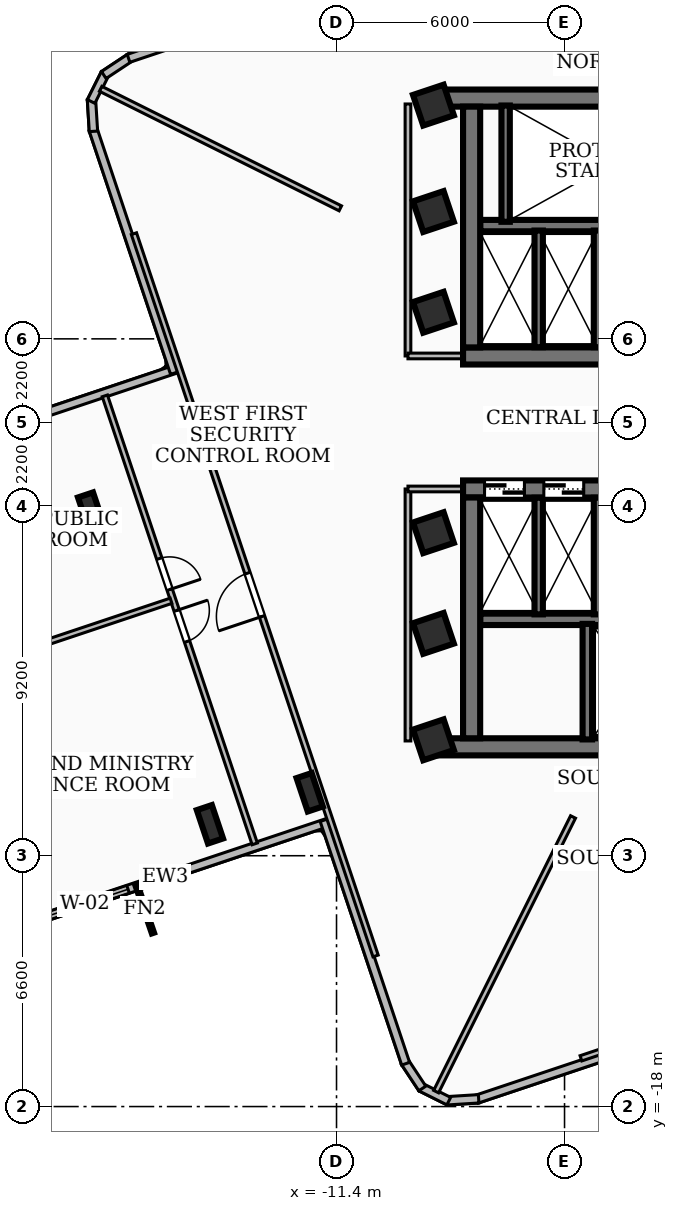
"""IFC4 building model, lengths in metres.
Left out: names, types, materials, properties, quantities, classifications, styles, units other than length and angle.
Written with IfcOpenShell. Run it as: python <this file> out.ifc"""

import sys

from ifc_helpers import new_model, si_unit, direction, frame, frame_2d, origin, origin_2d, place, context, subcontext, project, spatial, rectangle, i_section, extrude, element, fill, save


model = new_model("IFC4")
c1 = context("Model", 3, precision=1e-05, world=origin(), true_north=direction((0.0, 1.0)))
c2 = subcontext(c1, "Body", "Model", "MODEL_VIEW")
j1 = project(units=[si_unit("LENGTHUNIT", "METRE"), si_unit("PLANEANGLEUNIT", "RADIAN")], contexts=[c1])
p1 = place(None, origin())
s1 = spatial("IfcSite", under=j1, at=p1, CompositionType="ELEMENT")
p2 = place(p1, origin())
s2 = spatial("IfcBuilding", under=s1, at=p2, CompositionType="ELEMENT")
p3 = place(p2, frame((0.0, 0.0, 159.48)))
s3 = spatial("IfcBuildingStorey", under=s2, at=p3, CompositionType="ELEMENT", Elevation=159.48)
p4 = place(p3, frame((-8.78, 8.535, 0.0), z_axis=(0.0, 0.0, 1.0), x_axis=(1.0, 0.0, 0.0)))
e1 = element("IfcWall", 1, at=p4, inside=s3, PredefinedType="SHEAR", context=c2, shape_type="SweptSolid", body=[
    extrude(rectangle(XDim=17.56, YDim=0.45, at=frame_2d((8.78, 0.0))), origin(), (0.0, 0.0, 1.0), 3.34),
])
p5 = place(p3, frame((8.07, 1.75, 0.0), z_axis=(0.0, 0.0, 1.0), x_axis=(-1.0, 0.0, 0.0)))
e2 = element("IfcWall", 2, at=p5, inside=s3, PredefinedType="SHEAR", context=c2, shape_type="SweptSolid", body=[
    extrude(rectangle(XDim=16.14, YDim=0.45, at=frame_2d((8.07, 0.0))), origin(), (0.0, 0.0, 1.0), 3.34),
])
p6 = place(p5, frame((7.45, 0.0, 0.0)))
e3 = element("IfcOpeningElement", 3, at=p6, cuts=e2, PredefinedType="OPENING", context=c2, shape_type="SweptSolid", body=[
    extrude(rectangle(XDim=1.0, YDim=2.1, at=frame_2d((0.5, 1.05))), frame((0.0, 0.235, 0.0), z_axis=(0.0, -1.0, 0.0), x_axis=(1.0, 0.0, 0.0)), (0.0, 0.0, 1.0), 0.47),
])
p7 = place(p5, frame((3.4, 0.0, 0.0)))
e4 = element("IfcOpeningElement", 4, at=p7, cuts=e2, PredefinedType="OPENING", context=c2, shape_type="SweptSolid", body=[
    extrude(rectangle(XDim=0.9, YDim=2.06, at=frame_2d((0.45, 1.03))), frame((0.0, 0.235, 0.0), z_axis=(0.0, -1.0, 0.0), x_axis=(1.0, 0.0, 0.0)), (0.0, 0.0, 1.0), 0.47),
])
p8 = place(p5, frame((1.1, 0.0, 0.0)))
e5 = element("IfcOpeningElement", 5, at=p8, cuts=e2, PredefinedType="OPENING", context=c2, shape_type="SweptSolid", body=[
    extrude(rectangle(XDim=0.9, YDim=2.06, at=frame_2d((0.45, 1.03))), frame((0.0, 0.235, 0.0), z_axis=(0.0, -1.0, 0.0), x_axis=(1.0, 0.0, 0.0)), (0.0, 0.0, 1.0), 0.47),
])
p9 = place(p3, frame((-7.845, 1.975, 0.0), z_axis=(0.0, 0.0, 1.0), x_axis=(0.0, 1.0, 0.0)))
e6 = element("IfcWall", 6, at=p9, inside=s3, PredefinedType="SHEAR", context=c2, shape_type="SweptSolid", body=[
    extrude(rectangle(XDim=6.335, YDim=0.45, at=frame_2d((3.167, 0.0))), origin(), (0.0, 0.0, 1.0), 3.34),
])
p10 = place(p3, frame((7.62, 5.18, 0.0), z_axis=(0.0, 0.0, 1.0), x_axis=(-1.0, 0.0, 0.0)))
e7 = element("IfcWall", 7, at=p10, inside=s3, PredefinedType="SOLIDWALL", context=c2, shape_type="SweptSolid", body=[
    extrude(rectangle(XDim=15.24, YDim=0.3, at=frame_2d((7.62, 0.0))), origin(), (0.0, 0.0, 1.0), 3.34),
])
p11 = place(p10, frame((5.77, 0.0, 0.0)))
e8 = element("IfcOpeningElement", 8, at=p11, cuts=e7, PredefinedType="OPENING", context=c2, shape_type="SweptSolid", body=[
    extrude(rectangle(XDim=1.1, YDim=2.15, at=frame_2d((0.55, 1.075))), frame((0.0, 0.16, 0.0), z_axis=(0.0, -1.0, 0.0), x_axis=(1.0, 0.0, 0.0)), (0.0, 0.0, 1.0), 0.32),
])
p12 = place(p10, frame((2.97, 0.0, 0.0)))
e9 = element("IfcOpeningElement", 9, at=p12, cuts=e7, PredefinedType="OPENING", context=c2, shape_type="SweptSolid", body=[
    extrude(rectangle(XDim=1.1, YDim=2.15, at=frame_2d((0.55, 1.075))), frame((0.0, 0.16, 0.0), z_axis=(0.0, -1.0, 0.0), x_axis=(1.0, 0.0, 0.0)), (0.0, 0.0, 1.0), 0.32),
])
p13 = place(p10, frame((7.97, 0.0, 0.0)))
e10 = element("IfcOpeningElement", 10, at=p13, cuts=e7, PredefinedType="OPENING", context=c2, shape_type="SweptSolid", body=[
    extrude(rectangle(XDim=1.0, YDim=2.1, at=frame_2d((0.5, 1.05))), frame((0.0, 0.16, 0.0), z_axis=(0.0, -1.0, 0.0), x_axis=(1.0, 0.0, 0.0)), (0.0, 0.0, 1.0), 0.32),
])
p14 = place(p3, frame((8.78, -8.535, 0.0), z_axis=(0.0, 0.0, 1.0), x_axis=(-1.0, 0.0, 0.0)))
e11 = element("IfcWall", 11, at=p14, inside=s3, PredefinedType="SHEAR", context=c2, shape_type="SweptSolid", body=[
    extrude(rectangle(XDim=17.56, YDim=0.45, at=frame_2d((8.78, 0.0))), origin(), (0.0, 0.0, 1.0), 3.34),
])
p15 = place(p3, frame((-8.07, -1.75, 0.0), z_axis=(0.0, 0.0, 1.0), x_axis=(1.0, 0.0, 0.0)))
e12 = element("IfcWall", 12, at=p15, inside=s3, PredefinedType="SHEAR", context=c2, shape_type="SweptSolid", body=[
    extrude(rectangle(XDim=16.14, YDim=0.45, at=frame_2d((8.07, 0.0))), origin(), (0.0, 0.0, 1.0), 3.34),
])
p16 = place(p15, frame((7.45, 0.0, 0.0)))
e13 = element("IfcOpeningElement", 13, at=p16, cuts=e12, PredefinedType="OPENING", context=c2, shape_type="SweptSolid", body=[
    extrude(rectangle(XDim=1.0, YDim=2.1, at=frame_2d((0.5, 1.05))), frame((0.0, 0.235, 0.0), z_axis=(0.0, -1.0, 0.0), x_axis=(1.0, 0.0, 0.0)), (0.0, 0.0, 1.0), 0.47),
])
p17 = place(p15, frame((12.65, 0.0, 0.0)))
e14 = element("IfcOpeningElement", 14, at=p17, cuts=e12, PredefinedType="OPENING", context=c2, shape_type="SweptSolid", body=[
    extrude(rectangle(XDim=0.9, YDim=2.06, at=frame_2d((0.45, 1.03))), frame((0.0, 0.235, 0.0), z_axis=(0.0, -1.0, 0.0), x_axis=(1.0, 0.0, 0.0)), (0.0, 0.0, 1.0), 0.47),
])
p18 = place(p15, frame((0.565, 0.0, 0.0)))
e15 = element("IfcOpeningElement", 15, at=p18, cuts=e12, PredefinedType="OPENING", context=c2, shape_type="SweptSolid", body=[
    extrude(rectangle(XDim=1.05, YDim=2.15, at=frame_2d((0.525, 1.075))), frame((0.0, 0.235, 0.0), z_axis=(0.0, -1.0, 0.0), x_axis=(1.0, 0.0, 0.0)), (0.0, 0.0, 1.0), 0.47),
])
p19 = place(p15, frame((2.125, 0.0, 0.0)))
e16 = element("IfcOpeningElement", 16, at=p19, cuts=e12, PredefinedType="OPENING", context=c2, shape_type="SweptSolid", body=[
    extrude(rectangle(XDim=1.05, YDim=2.15, at=frame_2d((0.525, 1.075))), frame((0.0, 0.235, 0.0), z_axis=(0.0, -1.0, 0.0), x_axis=(1.0, 0.0, 0.0)), (0.0, 0.0, 1.0), 0.47),
])
p20 = place(p15, frame((3.685, 0.0, 0.0)))
e17 = element("IfcOpeningElement", 17, at=p20, cuts=e12, PredefinedType="OPENING", context=c2, shape_type="SweptSolid", body=[
    extrude(rectangle(XDim=1.05, YDim=2.15, at=frame_2d((0.525, 1.075))), frame((0.0, 0.235, 0.0), z_axis=(0.0, -1.0, 0.0), x_axis=(1.0, 0.0, 0.0)), (0.0, 0.0, 1.0), 0.47),
])
p21 = place(p3, frame((-7.845, -8.31, 0.0), z_axis=(0.0, 0.0, 1.0), x_axis=(0.0, 1.0, 0.0)))
e18 = element("IfcWall", 18, at=p21, inside=s3, PredefinedType="SHEAR", context=c2, shape_type="SweptSolid", body=[
    extrude(rectangle(XDim=6.335, YDim=0.45, at=frame_2d((3.167, 0.0))), origin(), (0.0, 0.0, 1.0), 3.34),
])
p22 = place(p3, frame((-7.62, -5.18, 0.0), z_axis=(0.0, 0.0, 1.0), x_axis=(1.0, 0.0, 0.0)))
e19 = element("IfcWall", 19, at=p22, inside=s3, PredefinedType="SOLIDWALL", context=c2, shape_type="SweptSolid", body=[
    extrude(rectangle(XDim=15.24, YDim=0.3, at=frame_2d((7.62, 0.0))), origin(), (0.0, 0.0, 1.0), 3.34),
])
p23 = place(p22, frame((5.77, 0.0, 0.0)))
e20 = element("IfcOpeningElement", 20, at=p23, cuts=e19, PredefinedType="OPENING", context=c2, shape_type="SweptSolid", body=[
    extrude(rectangle(XDim=1.1, YDim=2.15, at=frame_2d((0.55, 1.075))), frame((0.0, 0.16, 0.0), z_axis=(0.0, -1.0, 0.0), x_axis=(1.0, 0.0, 0.0)), (0.0, 0.0, 1.0), 0.32),
])
p24 = place(p22, frame((7.97, 0.0, 0.0)))
e21 = element("IfcOpeningElement", 21, at=p24, cuts=e19, PredefinedType="OPENING", context=c2, shape_type="SweptSolid", body=[
    extrude(rectangle(XDim=1.0, YDim=2.1, at=frame_2d((0.5, 1.05))), frame((0.0, 0.16, 0.0), z_axis=(0.0, -1.0, 0.0), x_axis=(1.0, 0.0, 0.0)), (0.0, 0.0, 1.0), 0.32),
])
p25 = place(p3, frame((-6.95, 5.28, 0.0), z_axis=(0.0, 0.0, 1.0), x_axis=(0.0, 1.0, 0.0)))
e22 = element("IfcWall", 22, at=p25, inside=s3, PredefinedType="SOLIDWALL", context=c2, shape_type="SweptSolid", body=[
    extrude(rectangle(XDim=3.06, YDim=0.22, at=frame_2d((1.53, 0.0))), origin(), (0.0, 0.0, 1.0), 3.34),
])
p26 = place(p3, frame((-4.8, -8.34, 0.0), z_axis=(0.0, 0.0, 1.0), x_axis=(0.0, 1.0, 0.0)))
e23 = element("IfcWall", 23, at=p26, inside=s3, PredefinedType="SOLIDWALL", context=c2, shape_type="SweptSolid", body=[
    extrude(rectangle(XDim=3.04, YDim=0.25, at=frame_2d((1.52, 0.0))), origin(), (0.0, 0.0, 1.0), 3.34),
])
for number, where, z_axis, x_axis in (
    (24, (-6.08, 1.98, 0.0), (0.0, 0.0, 1.0), (0.0, 1.0, 0.0)),
    (25, (-4.52, 1.98, 0.0), (0.0, 0.0, 1.0), (0.0, 1.0, 0.0)),
    (26, (-6.08, -5.05, 0.0), (0.0, 0.0, 1.0), (0.0, 1.0, 0.0)),
    (27, (-4.52, -5.05, 0.0), (0.0, 0.0, 1.0), (0.0, 1.0, 0.0)),
):
    element("IfcWall", number, at=place(p3, frame(where, z_axis=z_axis, x_axis=x_axis)), inside=s3, PredefinedType="SOLIDWALL", context=c2, shape_type="SweptSolid", body=[
        extrude(rectangle(XDim=3.07, YDim=0.22, at=frame_2d((1.535, 0.0))), origin(), (0.0, 0.0, 1.0), 3.34),
    ])
for number, where, z_axis, x_axis in (
    (28, (-8.85, -5.55, 0.0), (0.0, 0.0, 1.0), (0.948, 0.317, 0.0)),
    (29, (-8.85, -2.9, 0.0), (0.0, 0.0, 1.0), (0.948, 0.317, 0.0)),
    (30, (-8.85, 2.9, 0.0), (0.0, 0.0, 1.0), (0.948, 0.317, 0.0)),
    (31, (-8.85, 5.55, 0.0), (0.0, 0.0, 1.0), (0.948, 0.317, 0.0)),
    (32, (-8.85, 8.35, 0.0), (0.0, 0.0, 1.0), (0.948, 0.317, 0.0)),
    (33, (-8.85, -8.35, 0.0), (0.0, 0.0, 1.0), (0.948, 0.317, 0.0)),
):
    element("IfcColumn", number, at=place(p3, frame(where, z_axis=z_axis, x_axis=x_axis)), inside=s3, PredefinedType="COLUMN", context=c2, shape_type="SweptSolid", body=[
        extrude(rectangle(XDim=0.85, YDim=0.85, at=origin_2d()), origin(), (0.0, 0.0, 1.0), 3.6),
    ])
for number, where, z_axis, x_axis in (
    (34, (-17.858, -2.346, 0.0), (0.0, 0.0, 1.0), (0.948, 0.317, 0.0)),
    (35, (-12.106, -9.731, 0.0), (0.0, 0.0, 1.0), (0.948, 0.317, 0.0)),
    (36, (-14.731, -10.573, 0.0), (0.0, 0.0, 1.0), (0.948, 0.317, 0.0)),
):
    element("IfcColumn", number, at=place(p3, frame(where, z_axis=z_axis, x_axis=x_axis)), inside=s3, PredefinedType="COLUMN", context=c2, shape_type="SweptSolid", body=[
        extrude(i_section(OverallWidth=0.418, OverallDepth=0.927, WebThickness=0.019, FlangeThickness=0.032, at=origin_2d()), origin(), (0.0, 0.0, 1.0), 3.6),
    ])
p27 = place(p3, frame((-11.615, -10.519, 0.0), z_axis=(0.0, 0.0, 1.0), x_axis=(-0.948329626758, -0.317286808759, 0.0)))
e37 = element("IfcWall", 37, at=p27, inside=s3, PredefinedType="SOLIDWALL", context=c2, shape_type="SweptSolid", body=[
    extrude(rectangle(XDim=9.058, YDim=0.22, at=frame_2d((4.529, 0.0))), origin(), (0.0, 0.0, 1.0), 3.34),
])
p28 = place(p27, frame((5.558, 0.0, 0.85)))
e38 = element("IfcOpeningElement", 38, at=p28, cuts=e37, PredefinedType="OPENING", context=c2, shape_type="SweptSolid", body=[
    extrude(rectangle(XDim=2.4, YDim=2.1, at=frame_2d((1.2, 1.05))), frame((0.0, 0.12, 0.0), z_axis=(0.0, -1.0, 0.0), x_axis=(1.0, 0.0, 0.0)), (0.0, 0.0, 1.0), 0.24),
])
p29 = place(p3, frame((-24.197, -1.463, 0.0), z_axis=(0.0, 0.0, 1.0), x_axis=(0.948337736373, 0.31726256913, 0.0)))
e39 = element("IfcWall", 39, at=p29, inside=s3, PredefinedType="SOLIDWALL", context=c2, shape_type="SweptSolid", body=[
    extrude(rectangle(XDim=9.058, YDim=0.22, at=frame_2d((4.529, 0.0))), origin(), (0.0, 0.0, 1.0), 3.34),
])
p30 = place(p29, frame((1.1, 0.0, 0.85)))
e40 = element("IfcOpeningElement", 40, at=p30, cuts=e39, PredefinedType="OPENING", context=c2, shape_type="SweptSolid", body=[
    extrude(rectangle(XDim=2.4, YDim=1.65, at=frame_2d((1.2, 0.825))), frame((0.0, 0.12, 0.0), z_axis=(0.0, -1.0, 0.0), x_axis=(1.0, 0.0, 0.0)), (0.0, 0.0, 1.0), 0.24),
])
p31 = place(p3, frame((-15.662, 1.3, 0.0), z_axis=(0.0, 0.0, 1.0), x_axis=(-0.317224676093, 0.948350412494, 0.0)))
e41 = element("IfcWall", 41, at=p31, inside=s3, PredefinedType="SOLIDWALL", context=c2, shape_type="SweptSolid", body=[
    extrude(rectangle(XDim=6.758, YDim=0.22, at=frame_2d((3.379, 0.0))), origin(), (0.0, 0.0, 1.0), 3.34),
])
p32 = place(p3, frame((-17.796, 7.66, 0.0), z_axis=(0.0, 0.0, 1.0), x_axis=(-0.062305442082, 0.998057128569, 0.0)))
e42 = element("IfcWall", 42, at=p32, inside=s3, PredefinedType="SOLIDWALL", context=c2, shape_type="SweptSolid", body=[
    extrude(rectangle(XDim=0.835, YDim=0.22, at=frame_2d((0.417, 0.0))), origin(), (0.0, 0.0, 1.0), 3.34),
])
p33 = place(p3, frame((-17.857, 8.446, 0.0), z_axis=(0.0, 0.0, 1.0), x_axis=(0.446258139106, 0.894904281631, 0.0)))
e43 = element("IfcWall", 43, at=p33, inside=s3, PredefinedType="SOLIDWALL", context=c2, shape_type="SweptSolid", body=[
    extrude(rectangle(XDim=0.818, YDim=0.22, at=frame_2d((0.409, 0.0))), origin(), (0.0, 0.0, 1.0), 3.34),
])
p34 = place(p3, frame((-17.524, 9.142, 0.0), z_axis=(0.0, 0.0, 1.0), x_axis=(0.833756011094, 0.552133058206, 0.0)))
e44 = element("IfcWall", 44, at=p34, inside=s3, PredefinedType="SOLIDWALL", context=c2, shape_type="SweptSolid", body=[
    extrude(rectangle(XDim=0.835, YDim=0.22, at=frame_2d((0.417, 0.0))), origin(), (0.0, 0.0, 1.0), 3.34),
])
p35 = place(p3, frame((-16.873, 9.581, 0.0), z_axis=(0.0, 0.0, 1.0), x_axis=(0.94829606055, 0.317387116224, 0.0)))
e45 = element("IfcWall", 45, at=p35, inside=s3, PredefinedType="SOLIDWALL", context=c2, shape_type="SweptSolid", body=[
    extrude(rectangle(XDim=6.758, YDim=0.22, at=frame_2d((3.379, 0.0))), origin(), (0.0, 0.0, 1.0), 3.34),
])
p36 = place(p3, frame((-1.3, -15.662, 0.0), z_axis=(0.0, 0.0, 1.0), x_axis=(-0.948350412494, -0.317224676093, 0.0)))
e46 = element("IfcWall", 46, at=p36, inside=s3, PredefinedType="SOLIDWALL", context=c2, shape_type="SweptSolid", body=[
    extrude(rectangle(XDim=6.758, YDim=0.22, at=frame_2d((3.379, 0.0))), origin(), (0.0, 0.0, 1.0), 3.34),
])
p37 = place(p3, frame((-7.66, -17.796, 0.0), z_axis=(0.0, 0.0, 1.0), x_axis=(-0.998057128569, -0.062305442082, 0.0)))
e47 = element("IfcWall", 47, at=p37, inside=s3, PredefinedType="SOLIDWALL", context=c2, shape_type="SweptSolid", body=[
    extrude(rectangle(XDim=0.835, YDim=0.22, at=frame_2d((0.417, 0.0))), origin(), (0.0, 0.0, 1.0), 3.34),
])
p38 = place(p3, frame((-8.446, -17.857, 0.0), z_axis=(0.0, 0.0, 1.0), x_axis=(-0.894904281631, 0.446258139106, 0.0)))
e48 = element("IfcWall", 48, at=p38, inside=s3, PredefinedType="SOLIDWALL", context=c2, shape_type="SweptSolid", body=[
    extrude(rectangle(XDim=0.818, YDim=0.22, at=frame_2d((0.409, 0.0))), origin(), (0.0, 0.0, 1.0), 3.34),
])
p39 = place(p3, frame((-9.142, -17.524, 0.0), z_axis=(0.0, 0.0, 1.0), x_axis=(-0.552133058206, 0.833756011094, 0.0)))
e49 = element("IfcWall", 49, at=p39, inside=s3, PredefinedType="SOLIDWALL", context=c2, shape_type="SweptSolid", body=[
    extrude(rectangle(XDim=0.835, YDim=0.22, at=frame_2d((0.417, 0.0))), origin(), (0.0, 0.0, 1.0), 3.34),
])
p40 = place(p3, frame((-9.581, -16.873, 0.0), z_axis=(0.0, 0.0, 1.0), x_axis=(-0.317387116224, 0.94829606055, 0.0)))
e50 = element("IfcWall", 50, at=p40, inside=s3, PredefinedType="SOLIDWALL", context=c2, shape_type="SweptSolid", body=[
    extrude(rectangle(XDim=6.758, YDim=0.22, at=frame_2d((3.379, 0.0))), origin(), (0.0, 0.0, 1.0), 3.34),
])
p41 = place(p3, frame((-9.52, 1.75, 0.0), z_axis=(0.0, 0.0, 1.0), x_axis=(0.0, 1.0, 0.0)))
e51 = element("IfcWall", 51, at=p41, inside=s3, PredefinedType="PARTITIONING", context=c2, shape_type="SweptSolid", body=[
    extrude(rectangle(XDim=6.63, YDim=0.15, at=frame_2d((3.315, 0.0))), origin(), (0.0, 0.0, 1.0), 3.34),
])
p42 = place(p3, frame((-7.85, 1.75, 0.0), z_axis=(0.0, 0.0, 1.0), x_axis=(-1.0, 0.0, 0.0)))
e52 = element("IfcWall", 52, at=p42, inside=s3, PredefinedType="PARTITIONING", context=c2, shape_type="SweptSolid", body=[
    extrude(rectangle(XDim=1.67, YDim=0.15, at=frame_2d((0.835, 0.0))), origin(), (0.0, 0.0, 1.0), 2.57),
])
p43 = place(p3, frame((-9.52, -8.38, 0.0), z_axis=(0.0, 0.0, 1.0), x_axis=(0.0, 1.0, 0.0)))
e53 = element("IfcWall", 53, at=p43, inside=s3, PredefinedType="PARTITIONING", context=c2, shape_type="SweptSolid", body=[
    extrude(rectangle(XDim=6.63, YDim=0.15, at=frame_2d((3.315, 0.0))), origin(), (0.0, 0.0, 1.0), 2.644),
])
p44 = place(p3, frame((-7.85, -1.75, 0.0), z_axis=(0.0, 0.0, 1.0), x_axis=(-1.0, 0.0, 0.0)))
e54 = element("IfcWall", 54, at=p44, inside=s3, PredefinedType="PARTITIONING", context=c2, shape_type="SweptSolid", body=[
    extrude(rectangle(XDim=1.67, YDim=0.15, at=frame_2d((0.835, 0.0))), origin(), (0.0, 0.0, 1.0), 2.57),
])
p45 = place(p3, frame((-11.3, 5.634, 0.0), z_axis=(0.0, 0.0, 1.0), x_axis=(-0.894904738475, 0.446257222972, 0.0)))
e55 = element("IfcWall", 55, at=p45, inside=s3, PredefinedType="PARTITIONING", context=c2, shape_type="SweptSolid", body=[
    extrude(rectangle(XDim=7.048, YDim=0.145, at=frame_2d((3.524, 0.0))), origin(), (0.0, 0.0, 1.0), 3.34),
])
p46 = place(p3, frame((-5.176, -10.38, 0.0), z_axis=(0.0, 0.0, 1.0), x_axis=(-0.446173290391, -0.894946587759, 0.0)))
e56 = element("IfcWall", 56, at=p46, inside=s3, PredefinedType="PARTITIONING", context=c2, shape_type="SweptSolid", body=[
    extrude(rectangle(XDim=8.075, YDim=0.145, at=frame_2d((4.038, 0.0))), origin(), (0.0, 0.0, 1.0), 3.34),
])
p47 = place(p3, frame((-10.372, -14.037, 0.0), z_axis=(0.0, 0.0, 1.0), x_axis=(-0.317298382655, 0.94832575435, 0.0)))
e57 = element("IfcWall", 57, at=p47, inside=s3, PredefinedType="PARTITIONING", context=c2, shape_type="SweptSolid", body=[
    extrude(rectangle(XDim=20.041, YDim=0.145, at=frame_2d((10.021, 0.0))), origin(), (0.0, 0.0, 1.0), 2.644),
])
p48 = place(p47, frame((9.42, 0.0, 0.0)))
e58 = element("IfcOpeningElement", 58, at=p48, cuts=e57, PredefinedType="OPENING", context=c2, shape_type="SweptSolid", body=[
    extrude(rectangle(XDim=1.2, YDim=2.1, at=frame_2d((0.6, 1.05))), frame((0.0, 0.083, 0.0), z_axis=(0.0, -1.0, 0.0), x_axis=(1.0, 0.0, 0.0)), (0.0, 0.0, 1.0), 0.165),
])
p49 = place(p3, frame((-15.755, -4.692, 0.0), z_axis=(0.0, 0.0, 1.0), x_axis=(-0.948309976651, -0.31734553437, 0.0)))
e59 = element("IfcWall", 59, at=p49, inside=s3, PredefinedType="PARTITIONING", context=c2, shape_type="SweptSolid", body=[
    extrude(rectangle(XDim=8.385, YDim=0.145, at=frame_2d((4.193, 0.0))), origin(), (0.0, 0.0, 1.0), 2.793),
])
p50 = place(p3, frame((-17.496, 0.7, 0.0), z_axis=(0.0, 0.0, 1.0), x_axis=(0.317299961245, -0.948325226172, 0.0)))
e60 = element("IfcWall", 60, at=p50, inside=s3, PredefinedType="PARTITIONING", context=c2, shape_type="SweptSolid", body=[
    extrude(rectangle(XDim=12.43, YDim=0.145, at=frame_2d((6.215, 0.0))), origin(), (0.0, 0.0, 1.0), 2.644),
])
p51 = place(p50, frame((4.515, 0.0, 0.0)))
e61 = element("IfcOpeningElement", 61, at=p51, cuts=e60, PredefinedType="OPENING", context=c2, shape_type="SweptSolid", body=[
    extrude(rectangle(XDim=0.86, YDim=2.04, at=frame_2d((0.43, 1.02))), frame((0.0, 0.083, 0.0), z_axis=(0.0, -1.0, 0.0), x_axis=(1.0, 0.0, 0.0)), (0.0, 0.0, 1.0), 0.165),
])
p52 = place(p50, frame((5.955, 0.0, 0.0)))
e62 = element("IfcOpeningElement", 62, at=p52, cuts=e60, PredefinedType="OPENING", context=c2, shape_type="SweptSolid", body=[
    extrude(rectangle(XDim=0.86, YDim=2.04, at=frame_2d((0.43, 1.02))), frame((0.0, 0.083, 0.0), z_axis=(0.0, -1.0, 0.0), x_axis=(1.0, 0.0, 0.0)), (0.0, 0.0, 1.0), 0.165),
])
p53 = place(p3, frame((14.037, -10.372, 0.0), z_axis=(0.0, 0.0, 1.0), x_axis=(-0.94832575435, -0.317298382655, 0.0)))
e63 = element("IfcWall", 63, at=p53, inside=s3, PredefinedType="PARTITIONING", context=c2, shape_type="SweptSolid", body=[
    extrude(rectangle(XDim=20.041, YDim=0.145, at=frame_2d((10.021, 0.0))), origin(), (0.0, 0.0, 1.0), 2.644),
])
p54 = place(p53, frame((9.42, 0.0, 0.0)))
e64 = element("IfcOpeningElement", 64, at=p54, cuts=e63, PredefinedType="OPENING", context=c2, shape_type="SweptSolid", body=[
    extrude(rectangle(XDim=1.2, YDim=2.1, at=frame_2d((0.6, 1.05))), frame((0.0, 0.083, 0.0), z_axis=(0.0, -1.0, 0.0), x_axis=(1.0, 0.0, 0.0)), (0.0, 0.0, 1.0), 0.165),
])
p55 = place(p28, origin())
e65 = element("IfcWindow", 65, at=p55, inside=s3, PartitioningType="SINGLE_PANEL", PredefinedType="WINDOW", context=c2, shape_type="SweptSolid", body=[
    extrude(rectangle(XDim=2.4, YDim=2.1, at=frame_2d((1.2, 1.05))), frame((0.0, 0.03, 0.0), z_axis=(0.0, -1.0, 0.0), x_axis=(1.0, 0.0, 0.0)), (0.0, 0.0, 1.0), 0.06),
])
fill(e38, e65)
p56 = place(p18, origin())
e66 = element("IfcDoor", 66, at=p56, inside=s3, OperationType="DOUBLE_DOOR_SLIDING", PredefinedType="DOOR", context=c2, shape_type="SweptSolid", body=[
    extrude(rectangle(XDim=1.05, YDim=2.15, at=frame_2d((0.525, 1.075))), frame((0.0, 0.025, 0.0), z_axis=(0.0, -1.0, 0.0), x_axis=(1.0, 0.0, 0.0)), (0.0, 0.0, 1.0), 0.05),
])
fill(e15, e66)
p57 = place(p19, origin())
e67 = element("IfcDoor", 67, at=p57, inside=s3, OperationType="DOUBLE_DOOR_SLIDING", PredefinedType="DOOR", context=c2, shape_type="SweptSolid", body=[
    extrude(rectangle(XDim=1.05, YDim=2.15, at=frame_2d((0.525, 1.075))), frame((0.0, 0.025, 0.0), z_axis=(0.0, -1.0, 0.0), x_axis=(1.0, 0.0, 0.0)), (0.0, 0.0, 1.0), 0.05),
])
fill(e16, e67)
p58 = place(p48, origin())
e68 = element("IfcDoor", 68, at=p58, inside=s3, OperationType="SINGLE_SWING_LEFT", PredefinedType="DOOR", context=c2, shape_type="SweptSolid", body=[
    extrude(rectangle(XDim=1.2, YDim=2.1, at=frame_2d((0.6, 1.05))), frame((0.0, 0.025, 0.0), z_axis=(0.0, -1.0, 0.0), x_axis=(1.0, 0.0, 0.0)), (0.0, 0.0, 1.0), 0.05),
])
fill(e58, e68)
p59 = place(p51, origin())
e69 = element("IfcDoor", 69, at=p59, inside=s3, OperationType="SINGLE_SWING_RIGHT", PredefinedType="DOOR", context=c2, shape_type="SweptSolid", body=[
    extrude(rectangle(XDim=0.86, YDim=2.04, at=frame_2d((0.43, 1.02))), frame((0.0, 0.025, 0.0), z_axis=(0.0, -1.0, 0.0), x_axis=(1.0, 0.0, 0.0)), (0.0, 0.0, 1.0), 0.05),
])
fill(e61, e69)
p60 = place(p52, origin())
e70 = element("IfcDoor", 70, at=p60, inside=s3, OperationType="SINGLE_SWING_LEFT", PredefinedType="DOOR", context=c2, shape_type="SweptSolid", body=[
    extrude(rectangle(XDim=0.86, YDim=2.04, at=frame_2d((0.43, 1.02))), frame((0.0, 0.025, 0.0), z_axis=(0.0, -1.0, 0.0), x_axis=(1.0, 0.0, 0.0)), (0.0, 0.0, 1.0), 0.05),
])
fill(e62, e70)
save(model, sys.argv[1])
